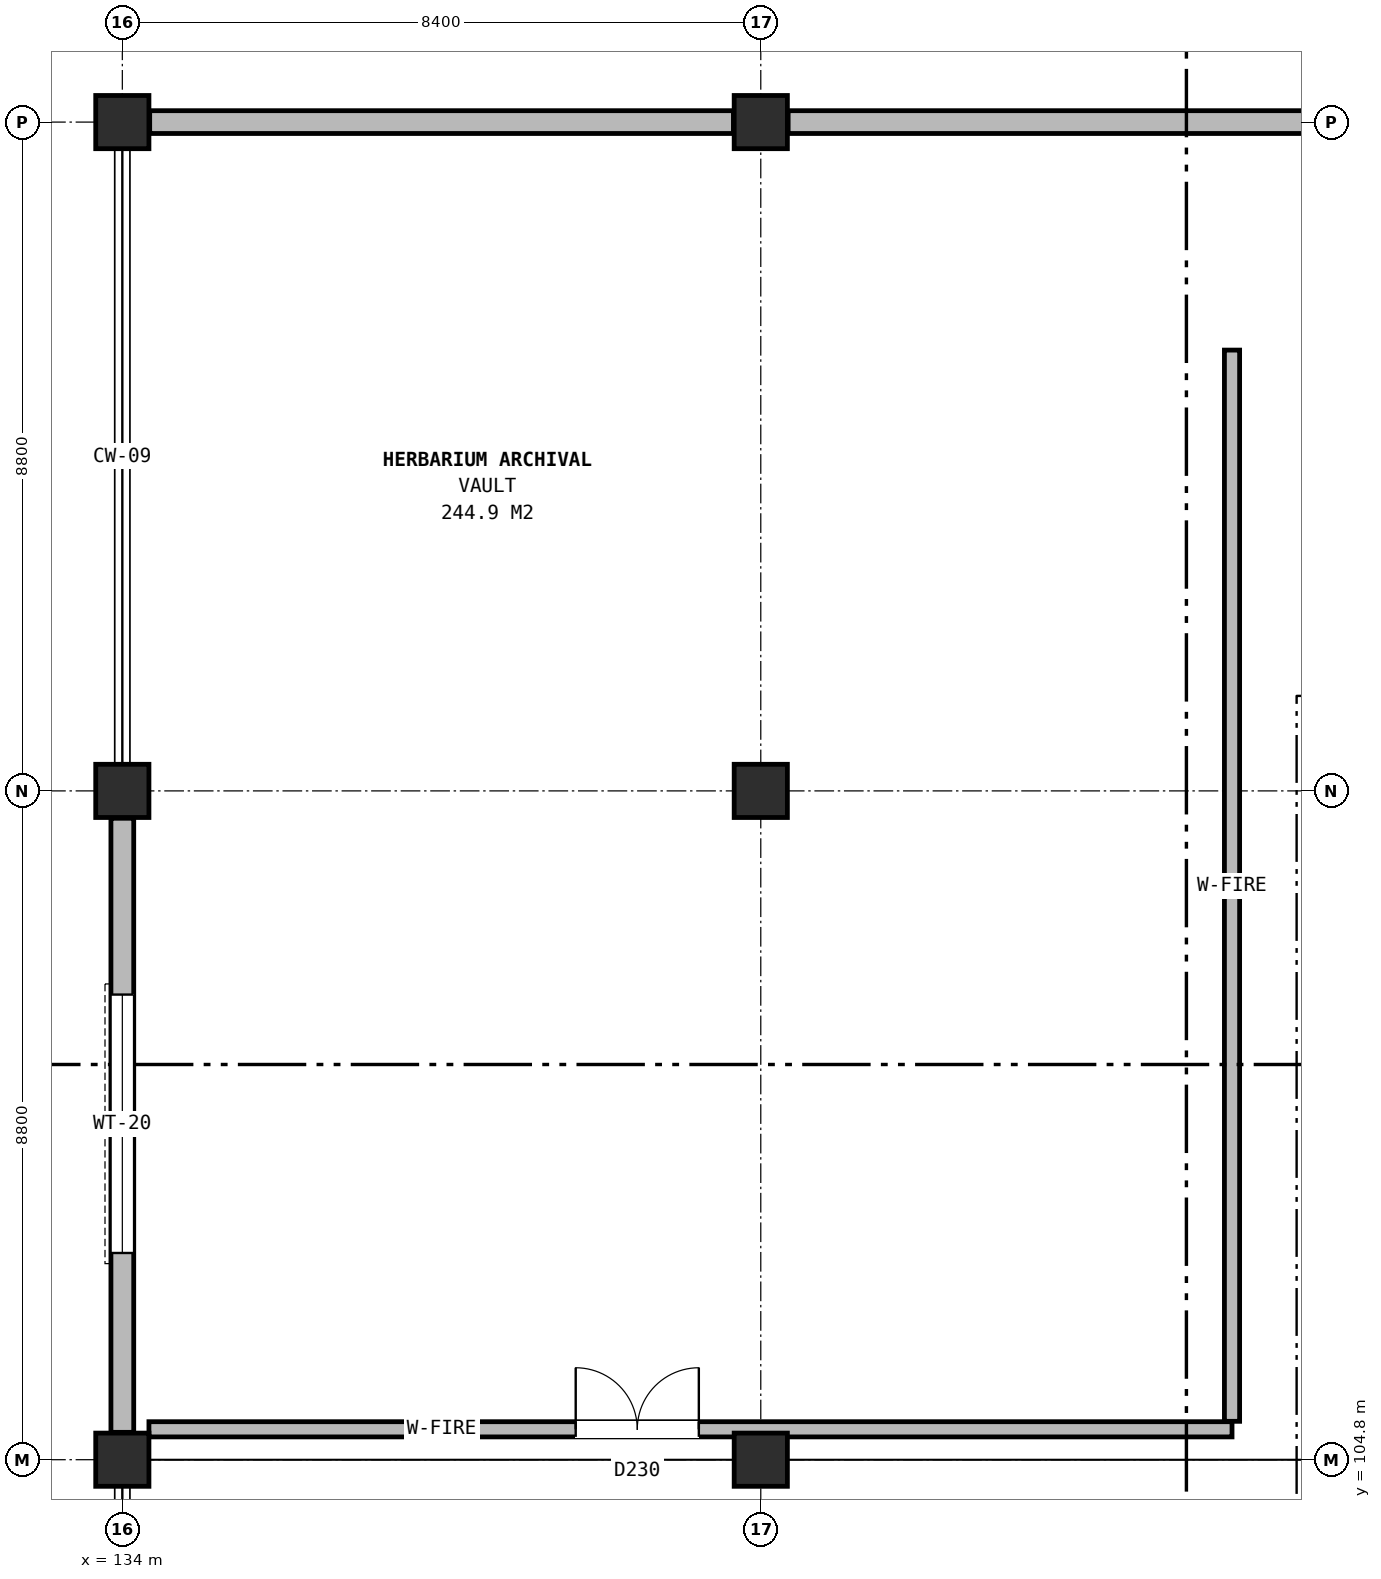
"""IFC4 building model, lengths in metres.
Left out: names, types, materials, properties, quantities, classifications, styles, units other than length and angle.
Written with IfcOpenShell. Run it as: python <this file> out.ifc"""

import sys

from ifc_helpers import new_model, si_unit, direction, frame, frame_2d, origin, origin_2d, place, context, subcontext, project, spatial, rectangle, extrude, element, fill, save


model = new_model("IFC4")
c1 = context("Model", 3, precision=1e-05, world=origin(), true_north=direction((0.0, 1.0)))
c2 = subcontext(c1, "Body", "Model", "MODEL_VIEW")
j1 = project(units=[si_unit("LENGTHUNIT", "METRE"), si_unit("PLANEANGLEUNIT", "RADIAN")], contexts=[c1])
p1 = place(None, origin())
s1 = spatial("IfcSite", under=j1, at=p1, CompositionType="ELEMENT")
p2 = place(p1, origin())
s2 = spatial("IfcBuilding", under=s1, at=p2, CompositionType="ELEMENT")
p3 = place(p2, frame((0.0, 0.0, 32.8)))
s3 = spatial("IfcBuildingStorey", under=s2, at=p3, CompositionType="ELEMENT", Elevation=32.8)
for number, where, z_axis, x_axis in (
    (1, (134.0, 104.8, 0.0), (0.0, 0.0, 1.0), (1.0, 0.0, 0.0)),
    (2, (134.0, 113.6, 0.0), (0.0, 0.0, 1.0), (1.0, 0.0, 0.0)),
    (3, (134.0, 122.4, 0.0), (0.0, 0.0, 1.0), (1.0, 0.0, 0.0)),
    (4, (142.4, 104.8, 0.0), (0.0, 0.0, 1.0), (1.0, 0.0, 0.0)),
    (5, (142.4, 113.6, 0.0), (0.0, 0.0, 1.0), (1.0, 0.0, 0.0)),
    (6, (142.4, 122.4, 0.0), (0.0, 0.0, 1.0), (1.0, 0.0, 0.0)),
):
    element("IfcColumn", number, at=place(p3, frame(where, z_axis=z_axis, x_axis=x_axis)), inside=s3, PredefinedType="COLUMN", context=c2, shape_type="SweptSolid", body=[
        extrude(rectangle(XDim=0.7, YDim=0.7, at=origin_2d()), origin(), (0.0, 0.0, 1.0), 4.0),
    ])
for number, where, z_axis, x_axis in (
    (7, (150.44, 122.4, 0.0), (0.0, 0.0, 1.0), (-1.0, 0.0, 0.0)),
    (8, (142.04, 122.4, 0.0), (0.0, 0.0, 1.0), (-1.0, 0.0, 0.0)),
):
    element("IfcWall", number, at=place(p3, frame(where, z_axis=z_axis, x_axis=x_axis)), inside=s3, PredefinedType="SOLIDWALL", context=c2, shape_type="SweptSolid", body=[
        extrude(rectangle(XDim=7.68, YDim=0.3, at=frame_2d((3.84, 0.0))), origin(), (0.0, 0.0, 1.0), 3.25),
    ])
p4 = place(p3, frame((134.0, 113.24, 0.0), z_axis=(0.0, 0.0, 1.0), x_axis=(0.0, -1.0, 0.0)))
e9 = element("IfcWall", 9, at=p4, inside=s3, PredefinedType="SOLIDWALL", context=c2, shape_type="SweptSolid", body=[
    extrude(rectangle(XDim=8.08, YDim=0.3, at=frame_2d((4.04, 0.0))), origin(), (0.0, 0.0, 1.0), 3.25),
])
p5 = place(p4, frame((2.32, 0.0, 0.9)))
e10 = element("IfcOpeningElement", 10, at=p5, cuts=e9, PredefinedType="OPENING", context=c2, shape_type="SweptSolid", body=[
    extrude(rectangle(XDim=3.4, YDim=2.15, at=frame_2d((1.7, 1.075))), frame((0.0, 0.16, 0.0), z_axis=(0.0, -1.0, 0.0), x_axis=(1.0, 0.0, 0.0)), (0.0, 0.0, 1.0), 0.32),
])
p6 = place(p3, frame((134.35, 105.2, 0.0), z_axis=(0.0, 0.0, 1.0), x_axis=(1.0, 0.0, 0.0)))
e11 = element("IfcWall", 11, at=p6, inside=s3, PredefinedType="PARTITIONING", context=c2, shape_type="SweptSolid", body=[
    extrude(rectangle(XDim=14.25, YDim=0.2, at=frame_2d((7.125, 0.0))), origin(), (0.0, 0.0, 1.0), 3.245),
])
p7 = place(p6, frame((5.615, 0.0, 0.0)))
e12 = element("IfcOpeningElement", 12, at=p7, cuts=e11, PredefinedType="OPENING", context=c2, shape_type="SweptSolid", body=[
    extrude(rectangle(XDim=1.62, YDim=2.25, at=frame_2d((0.81, 1.125))), frame((0.0, 0.11, 0.0), z_axis=(0.0, -1.0, 0.0), x_axis=(1.0, 0.0, 0.0)), (0.0, 0.0, 1.0), 0.22),
])
p8 = place(p3, frame((148.6, 105.305, 0.0), z_axis=(0.0, 0.0, 1.0), x_axis=(0.0, 1.0, 0.0)))
e13 = element("IfcWall", 13, at=p8, inside=s3, PredefinedType="PARTITIONING", context=c2, shape_type="SweptSolid", body=[
    extrude(rectangle(XDim=14.095, YDim=0.2, at=frame_2d((7.047, 0.0))), origin(), (0.0, 0.0, 1.0), 3.665),
])
p9 = place(p5, origin())
e14 = element("IfcWindow", 14, at=p9, inside=s3, PartitioningType="SINGLE_PANEL", PredefinedType="WINDOW", context=c2, shape_type="SweptSolid", body=[
    extrude(rectangle(XDim=3.4, YDim=2.15, at=frame_2d((1.7, 1.075))), frame((0.0, 0.03, 0.0), z_axis=(0.0, -1.0, 0.0), x_axis=(1.0, 0.0, 0.0)), (0.0, 0.0, 1.0), 0.06),
])
fill(e10, e14)
p10 = place(p7, origin())
e15 = element("IfcDoor", 15, at=p10, inside=s3, OperationType="DOUBLE_DOOR_SINGLE_SWING", PredefinedType="DOOR", context=c2, shape_type="SweptSolid", body=[
    extrude(rectangle(XDim=1.62, YDim=2.25, at=frame_2d((0.81, 1.125))), frame((0.0, 0.025, 0.0), z_axis=(0.0, -1.0, 0.0), x_axis=(1.0, 0.0, 0.0)), (0.0, 0.0, 1.0), 0.05),
])
fill(e12, e15)
save(model, sys.argv[1])
